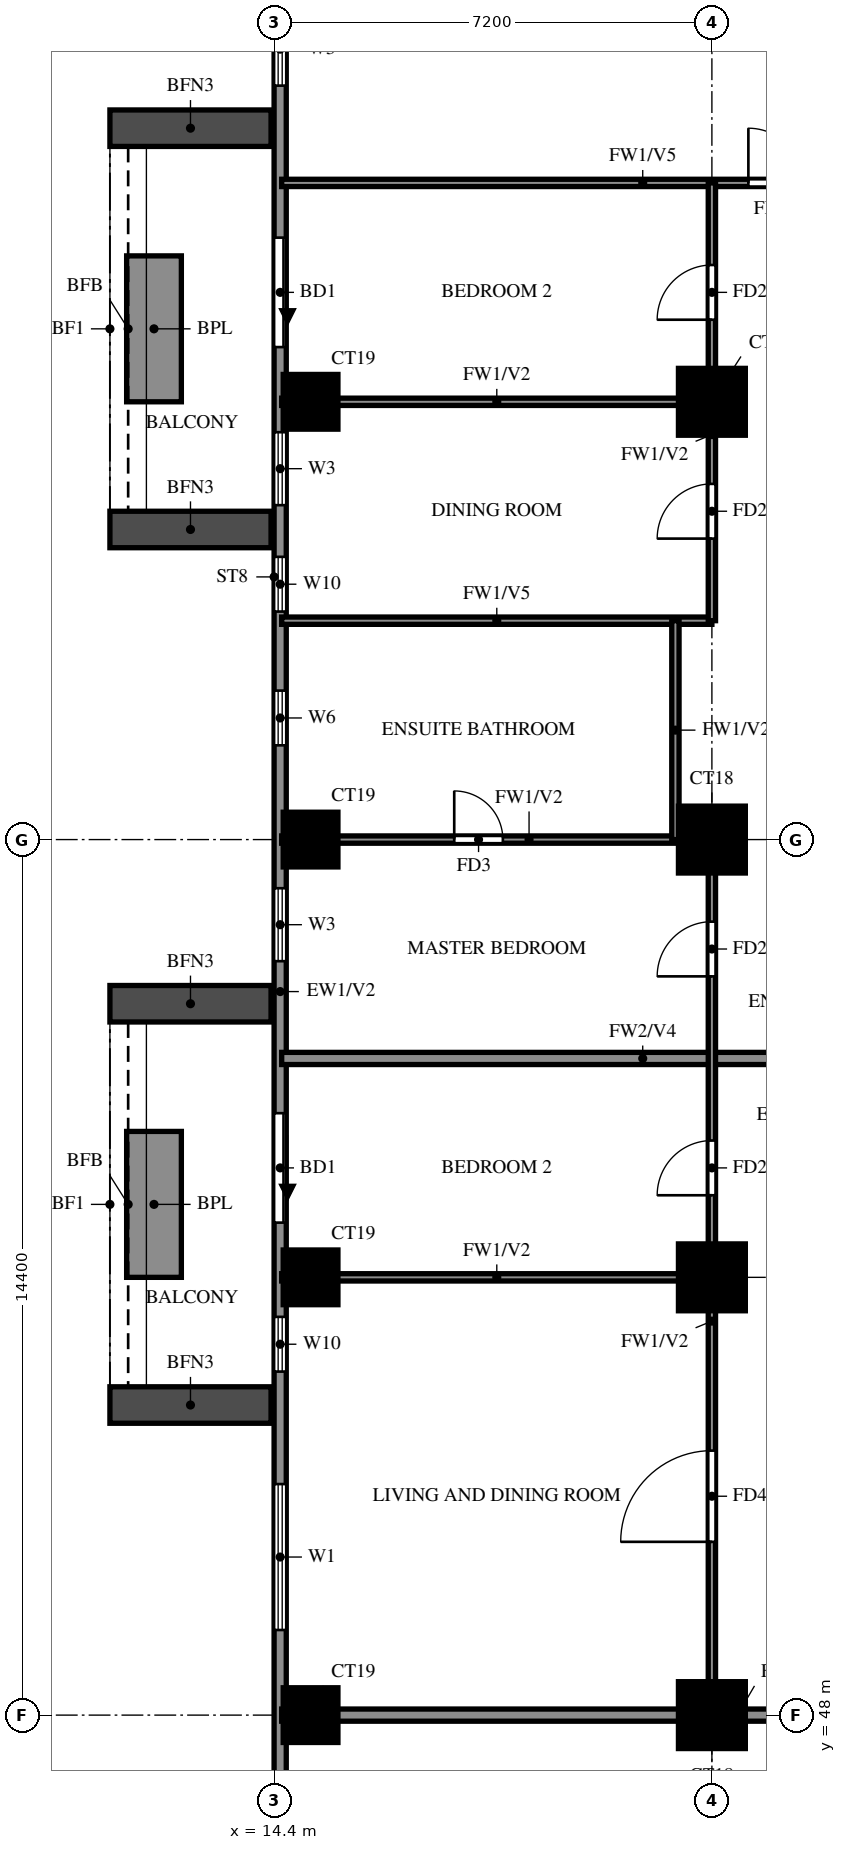
"""IFC4 building model, lengths in metres.
Left out: names, types, materials, properties, quantities, classifications, styles, units other than length and angle.
Written with IfcOpenShell. Run it as: python <this file> out.ifc"""

import sys

from ifc_helpers import new_model, si_unit, direction, frame, frame_2d, origin, origin_2d, place, context, subcontext, project, spatial, rectangle, extrude, source, transform, mapped, element, fill, save


model = new_model("IFC4")
c1 = context("Model", 3, precision=1e-05, world=origin(), true_north=direction((0.0, 1.0)))
c2 = subcontext(c1, "Body", "Model", "MODEL_VIEW")
j1 = project(units=[si_unit("LENGTHUNIT", "METRE"), si_unit("PLANEANGLEUNIT", "RADIAN")], contexts=[c1])
p1 = place(None, origin())
s1 = spatial("IfcSite", under=j1, at=p1, CompositionType="ELEMENT")
p2 = place(p1, origin())
s2 = spatial("IfcBuilding", under=s1, at=p2, CompositionType="ELEMENT")
p3 = place(p2, frame((0.0, 0.0, 123.5)))
s3 = spatial("IfcBuildingStorey", under=s2, at=p3, CompositionType="ELEMENT", Elevation=123.5)
m1 = source(origin(), c2, "Body", "SweptSolid", [
    extrude(rectangle(XDim=0.9, YDim=0.9, at=origin_2d()), origin(), (0.0, 0.0, 1.0), 3.2),
])
p4 = place(p3, frame((15.0, 48.0, 0.0), z_axis=(0.0, 0.0, 1.0), x_axis=(1.0, 0.0, 0.0)))
e1 = element("IfcColumn", 1, at=p4, inside=s3, PredefinedType="COLUMN", context=c2, shape_type="MappedRepresentation", body=[
    mapped(m1, transform((0.0, 0.0, 0.0))),
])
m2 = source(origin(), c2, "Body", "SweptSolid", [
    extrude(rectangle(XDim=1.1, YDim=1.1, at=origin_2d()), origin(), (0.0, 0.0, 1.0), 3.2),
])
p5 = place(p3, frame((21.6, 48.0, 0.0), z_axis=(0.0, 0.0, 1.0), x_axis=(1.0, 0.0, 0.0)))
e2 = element("IfcColumn", 2, at=p5, inside=s3, PredefinedType="COLUMN", context=c2, shape_type="MappedRepresentation", body=[
    mapped(m2, transform((0.0, 0.0, 0.0))),
])
p6 = place(p3, frame((15.0, 55.2, 0.0), z_axis=(0.0, 0.0, 1.0), x_axis=(1.0, 0.0, 0.0)))
e3 = element("IfcColumn", 3, at=p6, inside=s3, PredefinedType="COLUMN", context=c2, shape_type="MappedRepresentation", body=[
    mapped(m1, transform((0.0, 0.0, 0.0))),
])
p7 = place(p3, frame((21.6, 55.2, 0.0), z_axis=(0.0, 0.0, 1.0), x_axis=(1.0, 0.0, 0.0)))
e4 = element("IfcColumn", 4, at=p7, inside=s3, PredefinedType="COLUMN", context=c2, shape_type="MappedRepresentation", body=[
    mapped(m2, transform((0.0, 0.0, 0.0))),
])
p8 = place(p3, frame((15.0, 62.4, 0.0), z_axis=(0.0, 0.0, 1.0), x_axis=(1.0, 0.0, 0.0)))
e5 = element("IfcColumn", 5, at=p8, inside=s3, PredefinedType="COLUMN", context=c2, shape_type="MappedRepresentation", body=[
    mapped(m1, transform((0.0, 0.0, 0.0))),
])
p9 = place(p3, frame((21.6, 62.4, 0.0), z_axis=(0.0, 0.0, 1.0), x_axis=(1.0, 0.0, 0.0)))
e6 = element("IfcColumn", 6, at=p9, inside=s3, PredefinedType="COLUMN", context=c2, shape_type="MappedRepresentation", body=[
    mapped(m2, transform((0.0, 0.0, 0.0))),
])
p10 = place(p3, frame((15.0, 69.6, 0.0), z_axis=(0.0, 0.0, 1.0), x_axis=(1.0, 0.0, 0.0)))
e7 = element("IfcColumn", 7, at=p10, inside=s3, PredefinedType="COLUMN", context=c2, shape_type="MappedRepresentation", body=[
    mapped(m1, transform((0.0, 0.0, 0.0))),
])
p11 = place(p3, frame((21.6, 69.6, 0.0), z_axis=(0.0, 0.0, 1.0), x_axis=(1.0, 0.0, 0.0)))
e8 = element("IfcColumn", 8, at=p11, inside=s3, PredefinedType="COLUMN", context=c2, shape_type="MappedRepresentation", body=[
    mapped(m2, transform((0.0, 0.0, 0.0))),
])
p12 = place(p3, frame((14.5, 76.6, 0.0), z_axis=(0.0, 0.0, 1.0), x_axis=(0.0, -1.0, 0.0)))
e9 = element("IfcWall", 9, at=p12, inside=s3, PredefinedType="SOLIDWALL", context=c2, shape_type="SweptSolid", body=[
    extrude(rectangle(XDim=33.4, YDim=0.2, at=frame_2d((16.7, 0.0))), origin(), (0.0, 0.0, 1.0), 3.2),
])
p13 = place(p12, frame((4.3, 0.0, 0.0)))
e10 = element("IfcOpeningElement", 10, at=p13, cuts=e9, PredefinedType="OPENING", context=c2, shape_type="SweptSolid", body=[
    extrude(rectangle(XDim=1.8, YDim=2.4, at=frame_2d((0.9, 1.2))), frame((0.0, 0.11, 0.0), z_axis=(0.0, -1.0, 0.0), x_axis=(1.0, 0.0, 0.0)), (0.0, 0.0, 1.0), 0.22),
])
p14 = place(p12, frame((18.7, 0.0, 0.0)))
e11 = element("IfcOpeningElement", 11, at=p14, cuts=e9, PredefinedType="OPENING", context=c2, shape_type="SweptSolid", body=[
    extrude(rectangle(XDim=1.8, YDim=2.4, at=frame_2d((0.9, 1.2))), frame((0.0, 0.11, 0.0), z_axis=(0.0, -1.0, 0.0), x_axis=(1.0, 0.0, 0.0)), (0.0, 0.0, 1.0), 0.22),
])
p15 = place(p12, frame((29.9, 0.0, 0.6)))
e12 = element("IfcOpeningElement", 12, at=p15, cuts=e9, PredefinedType="OPENING", context=c2, shape_type="SweptSolid", body=[
    extrude(rectangle(XDim=2.4, YDim=2.4, at=frame_2d((1.2, 1.2))), frame((0.0, 0.11, 0.0), z_axis=(0.0, -1.0, 0.0), x_axis=(1.0, 0.0, 0.0)), (0.0, 0.0, 1.0), 0.22),
])
p16 = place(p12, frame((22.05, 0.0, 0.6)))
e13 = element("IfcOpeningElement", 13, at=p16, cuts=e9, PredefinedType="OPENING", context=c2, shape_type="SweptSolid", body=[
    extrude(rectangle(XDim=0.9, YDim=2.4, at=frame_2d((0.45, 1.2))), frame((0.0, 0.11, 0.0), z_axis=(0.0, -1.0, 0.0), x_axis=(1.0, 0.0, 0.0)), (0.0, 0.0, 1.0), 0.22),
])
p17 = place(p12, frame((24.8, 0.0, 0.6)))
e14 = element("IfcOpeningElement", 14, at=p17, cuts=e9, PredefinedType="OPENING", context=c2, shape_type="SweptSolid", body=[
    extrude(rectangle(XDim=2.4, YDim=2.4, at=frame_2d((1.2, 1.2))), frame((0.0, 0.11, 0.0), z_axis=(0.0, -1.0, 0.0), x_axis=(1.0, 0.0, 0.0)), (0.0, 0.0, 1.0), 0.22),
])
p18 = place(p12, frame((15.0, 0.0, 0.6)))
e15 = element("IfcOpeningElement", 15, at=p18, cuts=e9, PredefinedType="OPENING", context=c2, shape_type="SweptSolid", body=[
    extrude(rectangle(XDim=1.2, YDim=2.4, at=frame_2d((0.6, 1.2))), frame((0.0, 0.11, 0.0), z_axis=(0.0, -1.0, 0.0), x_axis=(1.0, 0.0, 0.0)), (0.0, 0.0, 1.0), 0.22),
])
p19 = place(p12, frame((11.75, 0.0, 1.5)))
e16 = element("IfcOpeningElement", 16, at=p19, cuts=e9, PredefinedType="OPENING", context=c2, shape_type="SweptSolid", body=[
    extrude(rectangle(XDim=0.9, YDim=0.9, at=frame_2d((0.45, 0.45))), frame((0.0, 0.11, 0.0), z_axis=(0.0, -1.0, 0.0), x_axis=(1.0, 0.0, 0.0)), (0.0, 0.0, 1.0), 0.22),
])
p20 = place(p12, frame((7.5, 0.0, 0.6)))
e17 = element("IfcOpeningElement", 17, at=p20, cuts=e9, PredefinedType="OPENING", context=c2, shape_type="SweptSolid", body=[
    extrude(rectangle(XDim=1.2, YDim=2.4, at=frame_2d((0.6, 1.2))), frame((0.0, 0.11, 0.0), z_axis=(0.0, -1.0, 0.0), x_axis=(1.0, 0.0, 0.0)), (0.0, 0.0, 1.0), 0.22),
])
p21 = place(p12, frame((9.55, 0.0, 0.6)))
e18 = element("IfcOpeningElement", 18, at=p21, cuts=e9, PredefinedType="OPENING", context=c2, shape_type="SweptSolid", body=[
    extrude(rectangle(XDim=0.9, YDim=2.4, at=frame_2d((0.45, 1.2))), frame((0.0, 0.11, 0.0), z_axis=(0.0, -1.0, 0.0), x_axis=(1.0, 0.0, 0.0)), (0.0, 0.0, 1.0), 0.22),
])
p22 = place(p12, frame((0.6, 0.0, 0.6)))
e19 = element("IfcOpeningElement", 19, at=p22, cuts=e9, PredefinedType="OPENING", context=c2, shape_type="SweptSolid", body=[
    extrude(rectangle(XDim=1.2, YDim=2.4, at=frame_2d((0.6, 1.2))), frame((0.0, 0.11, 0.0), z_axis=(0.0, -1.0, 0.0), x_axis=(1.0, 0.0, 0.0)), (0.0, 0.0, 1.0), 0.22),
])
for number, where, z_axis, x_axis in (
    (20, (14.35, 74.1, 0.0), (0.0, 0.0, 1.0), (-1.0, 0.0, 0.0)),
    (21, (14.35, 67.5, 0.0), (0.0, 0.0, 1.0), (-1.0, 0.0, 0.0)),
):
    element("IfcWall", number, at=place(p3, frame(where, z_axis=z_axis, x_axis=x_axis)), inside=s3, PredefinedType="SOLIDWALL", context=c2, shape_type="SweptSolid", body=[
        extrude(rectangle(XDim=2.65, YDim=0.6, at=frame_2d((1.325, 0.0))), origin(), (0.0, 0.0, 1.0), 2.85),
    ])
p23 = place(p3, frame((12.425, 72.0, 0.0), z_axis=(0.0, 0.0, 1.0), x_axis=(0.0, -1.0, 0.0)))
e22 = element("IfcWall", 22, at=p23, inside=s3, PredefinedType="SOLIDWALL", context=c2, shape_type="SweptSolid", body=[
    extrude(rectangle(XDim=2.4, YDim=0.9, at=frame_2d((1.2, 0.0))), origin(), (0.0, 0.0, 1.0), 0.9),
])
for number, where, z_axis, x_axis in (
    (23, (14.35, 59.7, 0.0), (0.0, 0.0, 1.0), (-1.0, 0.0, 0.0)),
    (24, (14.35, 53.1, 0.0), (0.0, 0.0, 1.0), (-1.0, 0.0, 0.0)),
):
    element("IfcWall", number, at=place(p3, frame(where, z_axis=z_axis, x_axis=x_axis)), inside=s3, PredefinedType="SOLIDWALL", context=c2, shape_type="SweptSolid", body=[
        extrude(rectangle(XDim=2.65, YDim=0.6, at=frame_2d((1.325, 0.0))), origin(), (0.0, 0.0, 1.0), 2.85),
    ])
p24 = place(p3, frame((12.425, 57.6, 0.0), z_axis=(0.0, 0.0, 1.0), x_axis=(0.0, -1.0, 0.0)))
e25 = element("IfcWall", 25, at=p24, inside=s3, PredefinedType="SOLIDWALL", context=c2, shape_type="SweptSolid", body=[
    extrude(rectangle(XDim=2.4, YDim=0.9, at=frame_2d((1.2, 0.0))), origin(), (0.0, 0.0, 1.0), 0.9),
])
p25 = place(p3, frame((14.525, 48.0, 0.0), z_axis=(0.0, 0.0, 1.0), x_axis=(1.0, 0.0, 0.0)))
e26 = element("IfcWall", 26, at=p25, inside=s3, PredefinedType="SOLIDWALL", context=c2, shape_type="SweptSolid", body=[
    extrude(rectangle(XDim=14.275, YDim=0.2, at=frame_2d((7.138, 0.0))), origin(), (0.0, 0.0, 1.0), 3.2),
])
p26 = place(p3, frame((14.525, 58.8, 0.0), z_axis=(0.0, 0.0, 1.0), x_axis=(1.0, 0.0, 0.0)))
e27 = element("IfcWall", 27, at=p26, inside=s3, PredefinedType="SOLIDWALL", context=c2, shape_type="SweptSolid", body=[
    extrude(rectangle(XDim=11.875, YDim=0.2, at=frame_2d((5.938, 0.0))), origin(), (0.0, 0.0, 1.0), 2.3),
])
p27 = place(p3, frame((14.525, 55.2, 0.0), z_axis=(0.0, 0.0, 1.0), x_axis=(1.0, 0.0, 0.0)))
e28 = element("IfcWall", 28, at=p27, inside=s3, PredefinedType="PARTITIONING", context=c2, shape_type="SweptSolid", body=[
    extrude(rectangle(XDim=7.075, YDim=0.12, at=frame_2d((3.538, 0.0))), origin(), (0.0, 0.0, 1.0), 3.2),
])
p28 = place(p3, frame((14.525, 62.4, 0.0), z_axis=(0.0, 0.0, 1.0), x_axis=(1.0, 0.0, 0.0)))
e29 = element("IfcWall", 29, at=p28, inside=s3, PredefinedType="PARTITIONING", context=c2, shape_type="SweptSolid", body=[
    extrude(rectangle(XDim=7.075, YDim=0.12, at=frame_2d((3.538, 0.0))), origin(), (0.0, 0.0, 1.0), 3.2),
])
p29 = place(p28, frame((2.837, 0.0, 0.0)))
e30 = element("IfcOpeningElement", 30, at=p29, cuts=e29, PredefinedType="OPENING", context=c2, shape_type="SweptSolid", body=[
    extrude(rectangle(XDim=0.8, YDim=2.1, at=frame_2d((0.4, 1.05))), frame((0.0, 0.07, 0.0), z_axis=(0.0, -1.0, 0.0), x_axis=(1.0, 0.0, 0.0)), (0.0, 0.0, 1.0), 0.14),
])
p30 = place(p3, frame((14.525, 66.0, 0.0), z_axis=(0.0, 0.0, 1.0), x_axis=(1.0, 0.0, 0.0)))
e31 = element("IfcWall", 31, at=p30, inside=s3, PredefinedType="PARTITIONING", context=c2, shape_type="SweptSolid", body=[
    extrude(rectangle(XDim=7.075, YDim=0.12, at=frame_2d((3.538, 0.0))), origin(), (0.0, 0.0, 1.0), 2.3),
])
p31 = place(p3, frame((14.525, 69.6, 0.0), z_axis=(0.0, 0.0, 1.0), x_axis=(1.0, 0.0, 0.0)))
e32 = element("IfcWall", 32, at=p31, inside=s3, PredefinedType="PARTITIONING", context=c2, shape_type="SweptSolid", body=[
    extrude(rectangle(XDim=7.075, YDim=0.12, at=frame_2d((3.538, 0.0))), origin(), (0.0, 0.0, 1.0), 3.2),
])
p32 = place(p3, frame((14.525, 73.2, 0.0), z_axis=(0.0, 0.0, 1.0), x_axis=(1.0, 0.0, 0.0)))
e33 = element("IfcWall", 33, at=p32, inside=s3, PredefinedType="PARTITIONING", context=c2, shape_type="SweptSolid", body=[
    extrude(rectangle(XDim=11.875, YDim=0.12, at=frame_2d((5.938, 0.0))), origin(), (0.0, 0.0, 1.0), 2.3),
])
p33 = place(p32, frame((7.675, 0.0, 0.0)))
e34 = element("IfcOpeningElement", 34, at=p33, cuts=e33, PredefinedType="OPENING", context=c2, shape_type="SweptSolid", body=[
    extrude(rectangle(XDim=0.9, YDim=2.1, at=frame_2d((0.45, 1.05))), frame((0.0, 0.07, 0.0), z_axis=(0.0, -1.0, 0.0), x_axis=(1.0, 0.0, 0.0)), (0.0, 0.0, 1.0), 0.14),
])
p34 = place(p3, frame((21.0, 62.4, 0.0), z_axis=(0.0, 0.0, 1.0), x_axis=(0.0, 1.0, 0.0)))
e35 = element("IfcWall", 35, at=p34, inside=s3, PredefinedType="PARTITIONING", context=c2, shape_type="SweptSolid", body=[
    extrude(rectangle(XDim=3.6, YDim=0.12, at=frame_2d((1.8, 0.0))), origin(), (0.0, 0.0, 1.0), 3.2),
])
p35 = place(p3, frame((21.6, 48.0, 0.0), z_axis=(0.0, 0.0, 1.0), x_axis=(0.0, 1.0, 0.0)))
e36 = element("IfcWall", 36, at=p35, inside=s3, PredefinedType="PARTITIONING", context=c2, shape_type="SweptSolid", body=[
    extrude(rectangle(XDim=14.4, YDim=0.12, at=frame_2d((7.2, 0.0))), origin(), (0.0, 0.0, 1.0), 3.2),
])
p36 = place(p35, frame((2.85, 0.0, 0.0)))
e37 = element("IfcOpeningElement", 37, at=p36, cuts=e36, PredefinedType="OPENING", context=c2, shape_type="SweptSolid", body=[
    extrude(rectangle(XDim=1.5, YDim=2.1, at=frame_2d((0.75, 1.05))), frame((0.0, 0.07, 0.0), z_axis=(0.0, -1.0, 0.0), x_axis=(1.0, 0.0, 0.0)), (0.0, 0.0, 1.0), 0.14),
])
p37 = place(p35, frame((8.55, 0.0, 0.0)))
e38 = element("IfcOpeningElement", 38, at=p37, cuts=e36, PredefinedType="OPENING", context=c2, shape_type="SweptSolid", body=[
    extrude(rectangle(XDim=0.9, YDim=2.1, at=frame_2d((0.45, 1.05))), frame((0.0, 0.07, 0.0), z_axis=(0.0, -1.0, 0.0), x_axis=(1.0, 0.0, 0.0)), (0.0, 0.0, 1.0), 0.14),
])
p38 = place(p35, frame((12.15, 0.0, 0.0)))
e39 = element("IfcOpeningElement", 39, at=p38, cuts=e36, PredefinedType="OPENING", context=c2, shape_type="SweptSolid", body=[
    extrude(rectangle(XDim=0.9, YDim=2.1, at=frame_2d((0.45, 1.05))), frame((0.0, 0.07, 0.0), z_axis=(0.0, -1.0, 0.0), x_axis=(1.0, 0.0, 0.0)), (0.0, 0.0, 1.0), 0.14),
])
p39 = place(p3, frame((21.6, 66.0, 0.0), z_axis=(0.0, 0.0, 1.0), x_axis=(0.0, 1.0, 0.0)))
e40 = element("IfcWall", 40, at=p39, inside=s3, PredefinedType="PARTITIONING", context=c2, shape_type="SweptSolid", body=[
    extrude(rectangle(XDim=7.2, YDim=0.12, at=frame_2d((3.6, 0.0))), origin(), (0.0, 0.0, 1.0), 3.2),
])
p40 = place(p39, frame((1.35, 0.0, 0.0)))
e41 = element("IfcOpeningElement", 41, at=p40, cuts=e40, PredefinedType="OPENING", context=c2, shape_type="SweptSolid", body=[
    extrude(rectangle(XDim=0.9, YDim=2.1, at=frame_2d((0.45, 1.05))), frame((0.0, 0.07, 0.0), z_axis=(0.0, -1.0, 0.0), x_axis=(1.0, 0.0, 0.0)), (0.0, 0.0, 1.0), 0.14),
])
p41 = place(p39, frame((4.95, 0.0, 0.0)))
e42 = element("IfcOpeningElement", 42, at=p41, cuts=e40, PredefinedType="OPENING", context=c2, shape_type="SweptSolid", body=[
    extrude(rectangle(XDim=0.9, YDim=2.1, at=frame_2d((0.45, 1.05))), frame((0.0, 0.07, 0.0), z_axis=(0.0, -1.0, 0.0), x_axis=(1.0, 0.0, 0.0)), (0.0, 0.0, 1.0), 0.14),
])
p42 = place(p13, origin())
e43 = element("IfcDoor", 43, at=p42, inside=s3, OperationType="DOUBLE_DOOR_SLIDING", PredefinedType="DOOR", context=c2, shape_type="SweptSolid", body=[
    extrude(rectangle(XDim=1.8, YDim=2.4, at=frame_2d((0.9, 1.2))), frame((0.0, 0.025, 0.0), z_axis=(0.0, -1.0, 0.0), x_axis=(1.0, 0.0, 0.0)), (0.0, 0.0, 1.0), 0.05),
])
fill(e10, e43)
p43 = place(p14, origin())
e44 = element("IfcDoor", 44, at=p43, inside=s3, OperationType="DOUBLE_DOOR_SLIDING", PredefinedType="DOOR", context=c2, shape_type="SweptSolid", body=[
    extrude(rectangle(XDim=1.8, YDim=2.4, at=frame_2d((0.9, 1.2))), frame((0.0, 0.025, 0.0), z_axis=(0.0, -1.0, 0.0), x_axis=(1.0, 0.0, 0.0)), (0.0, 0.0, 1.0), 0.05),
])
fill(e11, e44)
p44 = place(p16, origin())
e45 = element("IfcWindow", 45, at=p44, inside=s3, PartitioningType="SINGLE_PANEL", PredefinedType="WINDOW", context=c2, shape_type="SweptSolid", body=[
    extrude(rectangle(XDim=0.9, YDim=2.4, at=frame_2d((0.45, 1.2))), frame((0.0, 0.03, 0.0), z_axis=(0.0, -1.0, 0.0), x_axis=(1.0, 0.0, 0.0)), (0.0, 0.0, 1.0), 0.06),
])
fill(e13, e45)
p45 = place(p17, origin())
e46 = element("IfcWindow", 46, at=p45, inside=s3, PartitioningType="DOUBLE_PANEL_VERTICAL", PredefinedType="WINDOW", context=c2, shape_type="SweptSolid", body=[
    extrude(rectangle(XDim=2.4, YDim=2.4, at=frame_2d((1.2, 1.2))), frame((0.0, 0.03, 0.0), z_axis=(0.0, -1.0, 0.0), x_axis=(1.0, 0.0, 0.0)), (0.0, 0.0, 1.0), 0.06),
])
fill(e14, e46)
p46 = place(p18, origin())
e47 = element("IfcWindow", 47, at=p46, inside=s3, PartitioningType="SINGLE_PANEL", PredefinedType="WINDOW", context=c2, shape_type="SweptSolid", body=[
    extrude(rectangle(XDim=1.2, YDim=2.4, at=frame_2d((0.6, 1.2))), frame((0.0, 0.03, 0.0), z_axis=(0.0, -1.0, 0.0), x_axis=(1.0, 0.0, 0.0)), (0.0, 0.0, 1.0), 0.06),
])
fill(e15, e47)
p47 = place(p19, origin())
e48 = element("IfcWindow", 48, at=p47, inside=s3, PartitioningType="SINGLE_PANEL", PredefinedType="WINDOW", context=c2, shape_type="SweptSolid", body=[
    extrude(rectangle(XDim=0.9, YDim=0.9, at=frame_2d((0.45, 0.45))), frame((0.0, 0.03, 0.0), z_axis=(0.0, -1.0, 0.0), x_axis=(1.0, 0.0, 0.0)), (0.0, 0.0, 1.0), 0.06),
])
fill(e16, e48)
p48 = place(p20, origin())
e49 = element("IfcWindow", 49, at=p48, inside=s3, PartitioningType="SINGLE_PANEL", PredefinedType="WINDOW", context=c2, shape_type="SweptSolid", body=[
    extrude(rectangle(XDim=1.2, YDim=2.4, at=frame_2d((0.6, 1.2))), frame((0.0, 0.03, 0.0), z_axis=(0.0, -1.0, 0.0), x_axis=(1.0, 0.0, 0.0)), (0.0, 0.0, 1.0), 0.06),
])
fill(e17, e49)
p49 = place(p21, origin())
e50 = element("IfcWindow", 50, at=p49, inside=s3, PartitioningType="SINGLE_PANEL", PredefinedType="WINDOW", context=c2, shape_type="SweptSolid", body=[
    extrude(rectangle(XDim=0.9, YDim=2.4, at=frame_2d((0.45, 1.2))), frame((0.0, 0.03, 0.0), z_axis=(0.0, -1.0, 0.0), x_axis=(1.0, 0.0, 0.0)), (0.0, 0.0, 1.0), 0.06),
])
fill(e18, e50)
p50 = place(p22, origin())
e51 = element("IfcWindow", 51, at=p50, inside=s3, PartitioningType="SINGLE_PANEL", PredefinedType="WINDOW", context=c2, shape_type="SweptSolid", body=[
    extrude(rectangle(XDim=1.2, YDim=2.4, at=frame_2d((0.6, 1.2))), frame((0.0, 0.03, 0.0), z_axis=(0.0, -1.0, 0.0), x_axis=(1.0, 0.0, 0.0)), (0.0, 0.0, 1.0), 0.06),
])
fill(e19, e51)
p51 = place(p36, origin())
e52 = element("IfcDoor", 52, at=p51, inside=s3, OperationType="SINGLE_SWING_RIGHT", PredefinedType="DOOR", context=c2, shape_type="SweptSolid", body=[
    extrude(rectangle(XDim=1.5, YDim=2.1, at=frame_2d((0.75, 1.05))), frame((0.0, 0.025, 0.0), z_axis=(0.0, -1.0, 0.0), x_axis=(1.0, 0.0, 0.0)), (0.0, 0.0, 1.0), 0.05),
])
fill(e37, e52)
p52 = place(p37, origin())
e53 = element("IfcDoor", 53, at=p52, inside=s3, OperationType="SINGLE_SWING_LEFT", PredefinedType="DOOR", context=c2, shape_type="SweptSolid", body=[
    extrude(rectangle(XDim=0.9, YDim=2.1, at=frame_2d((0.45, 1.05))), frame((0.0, 0.025, 0.0), z_axis=(0.0, -1.0, 0.0), x_axis=(1.0, 0.0, 0.0)), (0.0, 0.0, 1.0), 0.05),
])
fill(e38, e53)
p53 = place(p38, origin())
e54 = element("IfcDoor", 54, at=p53, inside=s3, OperationType="SINGLE_SWING_RIGHT", PredefinedType="DOOR", context=c2, shape_type="SweptSolid", body=[
    extrude(rectangle(XDim=0.9, YDim=2.1, at=frame_2d((0.45, 1.05))), frame((0.0, 0.025, 0.0), z_axis=(0.0, -1.0, 0.0), x_axis=(1.0, 0.0, 0.0)), (0.0, 0.0, 1.0), 0.05),
])
fill(e39, e54)
p54 = place(p29, origin())
e55 = element("IfcDoor", 55, at=p54, inside=s3, OperationType="SINGLE_SWING_LEFT", PredefinedType="DOOR", context=c2, shape_type="SweptSolid", body=[
    extrude(rectangle(XDim=0.8, YDim=2.1, at=frame_2d((0.4, 1.05))), frame((0.0, 0.025, 0.0), z_axis=(0.0, -1.0, 0.0), x_axis=(1.0, 0.0, 0.0)), (0.0, 0.0, 1.0), 0.05),
])
fill(e30, e55)
p55 = place(p40, origin())
e56 = element("IfcDoor", 56, at=p55, inside=s3, OperationType="SINGLE_SWING_LEFT", PredefinedType="DOOR", context=c2, shape_type="SweptSolid", body=[
    extrude(rectangle(XDim=0.9, YDim=2.1, at=frame_2d((0.45, 1.05))), frame((0.0, 0.025, 0.0), z_axis=(0.0, -1.0, 0.0), x_axis=(1.0, 0.0, 0.0)), (0.0, 0.0, 1.0), 0.05),
])
fill(e41, e56)
p56 = place(p41, origin())
e57 = element("IfcDoor", 57, at=p56, inside=s3, OperationType="SINGLE_SWING_RIGHT", PredefinedType="DOOR", context=c2, shape_type="SweptSolid", body=[
    extrude(rectangle(XDim=0.9, YDim=2.1, at=frame_2d((0.45, 1.05))), frame((0.0, 0.025, 0.0), z_axis=(0.0, -1.0, 0.0), x_axis=(1.0, 0.0, 0.0)), (0.0, 0.0, 1.0), 0.05),
])
fill(e42, e57)
p57 = place(p33, origin())
e58 = element("IfcDoor", 58, at=p57, inside=s3, OperationType="SINGLE_SWING_LEFT", PredefinedType="DOOR", context=c2, shape_type="SweptSolid", body=[
    extrude(rectangle(XDim=0.9, YDim=2.1, at=frame_2d((0.45, 1.05))), frame((0.0, 0.025, 0.0), z_axis=(0.0, -1.0, 0.0), x_axis=(1.0, 0.0, 0.0)), (0.0, 0.0, 1.0), 0.05),
])
fill(e34, e58)
save(model, sys.argv[1])
